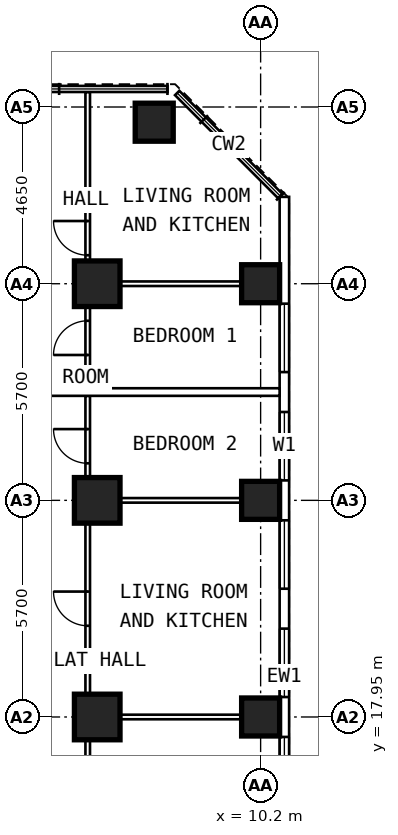
"""IFC4 building model, lengths in metres.
Left out: names, types, materials, properties, quantities, classifications, styles, units other than length and angle.
Written with IfcOpenShell. Run it as: python <this file> out.ifc"""

import sys

from ifc_helpers import new_model, si_unit, direction, frame, frame_2d, origin, origin_2d, place, context, subcontext, project, spatial, rectangle, extrude, element, fill, save


model = new_model("IFC4")
c1 = context("Model", 3, precision=1e-05, world=origin(), true_north=direction((0.0, 1.0)))
c2 = subcontext(c1, "Body", "Model", "MODEL_VIEW")
j1 = project(units=[si_unit("LENGTHUNIT", "METRE"), si_unit("PLANEANGLEUNIT", "RADIAN")], contexts=[c1])
p1 = place(None, origin())
s1 = spatial("IfcSite", under=j1, at=p1, CompositionType="ELEMENT")
p2 = place(p1, origin())
s2 = spatial("IfcBuilding", under=s1, at=p2, CompositionType="ELEMENT")
p3 = place(p2, frame((0.0, 0.0, 71.8)))
s3 = spatial("IfcBuildingStorey", under=s2, at=p3, CompositionType="ELEMENT", Elevation=71.8)
for number, where, z_axis, x_axis in (
    (1, (10.2, 17.95, 0.0), (0.0, 0.0, 1.0), (0.0, 1.0, 0.0)),
    (2, (10.2, 23.65, 0.0), (0.0, 0.0, 1.0), (0.0, 1.0, 0.0)),
    (3, (10.2, 29.35, 0.0), (0.0, 0.0, 1.0), (0.0, 1.0, 0.0)),
    (4, (7.4, 33.6, 0.0), (0.0, 0.0, 1.0), (0.0, 1.0, 0.0)),
):
    element("IfcColumn", number, at=place(p3, frame(where, z_axis=z_axis, x_axis=x_axis)), inside=s3, PredefinedType="COLUMN", context=c2, shape_type="SweptSolid", body=[
        extrude(rectangle(XDim=1.0, YDim=1.0, at=origin_2d()), origin(), (0.0, 0.0, 1.0), 3.6),
    ])
for number, where, z_axis, x_axis in (
    (5, (5.9, 17.95, 0.0), (0.0, 0.0, 1.0), (0.0, 1.0, 0.0)),
    (6, (5.9, 23.65, 0.0), (0.0, 0.0, 1.0), (0.0, 1.0, 0.0)),
    (7, (5.9, 29.35, 0.0), (0.0, 0.0, 1.0), (0.0, 1.0, 0.0)),
):
    element("IfcColumn", number, at=place(p3, frame(where, z_axis=z_axis, x_axis=x_axis)), inside=s3, PredefinedType="COLUMN", context=c2, shape_type="SweptSolid", body=[
        extrude(rectangle(XDim=1.2, YDim=1.2, at=origin_2d()), origin(), (0.0, 0.0, 1.0), 3.6),
    ])
p4 = place(p3, frame((10.825, 6.394, 0.0), z_axis=(0.0, 0.0, 1.0), x_axis=(0.0, 1.0, 0.0)))
e8 = element("IfcWall", 8, at=p4, inside=s3, PredefinedType="SOLIDWALL", context=c2, shape_type="SweptSolid", body=[
    extrude(rectangle(XDim=25.241, YDim=0.25, at=frame_2d((12.621, 0.0))), origin(), (0.0, 0.0, 1.0), 3.35),
])
p5 = place(p4, frame((0.681, 0.0, 0.8)))
e9 = element("IfcOpeningElement", 9, at=p5, cuts=e8, PredefinedType="OPENING", context=c2, shape_type="SweptSolid", body=[
    extrude(rectangle(XDim=1.8, YDim=1.8, at=frame_2d((0.9, 0.9))), frame((0.0, 0.137, 0.0), z_axis=(0.0, -1.0, 0.0), x_axis=(1.0, 0.0, 0.0)), (0.0, 0.0, 1.0), 0.274),
])
p6 = place(p4, frame((3.531, 0.0, 0.8)))
e10 = element("IfcOpeningElement", 10, at=p6, cuts=e8, PredefinedType="OPENING", context=c2, shape_type="SweptSolid", body=[
    extrude(rectangle(XDim=1.8, YDim=1.8, at=frame_2d((0.9, 0.9))), frame((0.0, 0.137, 0.0), z_axis=(0.0, -1.0, 0.0), x_axis=(1.0, 0.0, 0.0)), (0.0, 0.0, 1.0), 0.274),
])
p7 = place(p4, frame((6.381, 0.0, 0.8)))
e11 = element("IfcOpeningElement", 11, at=p7, cuts=e8, PredefinedType="OPENING", context=c2, shape_type="SweptSolid", body=[
    extrude(rectangle(XDim=1.8, YDim=1.8, at=frame_2d((0.9, 0.9))), frame((0.0, 0.137, 0.0), z_axis=(0.0, -1.0, 0.0), x_axis=(1.0, 0.0, 0.0)), (0.0, 0.0, 1.0), 0.274),
])
p8 = place(p4, frame((9.231, 0.0, 0.8)))
e12 = element("IfcOpeningElement", 12, at=p8, cuts=e8, PredefinedType="OPENING", context=c2, shape_type="SweptSolid", body=[
    extrude(rectangle(XDim=1.8, YDim=1.8, at=frame_2d((0.9, 0.9))), frame((0.0, 0.137, 0.0), z_axis=(0.0, -1.0, 0.0), x_axis=(1.0, 0.0, 0.0)), (0.0, 0.0, 1.0), 0.274),
])
p9 = place(p4, frame((12.081, 0.0, 0.8)))
e13 = element("IfcOpeningElement", 13, at=p9, cuts=e8, PredefinedType="OPENING", context=c2, shape_type="SweptSolid", body=[
    extrude(rectangle(XDim=1.8, YDim=1.8, at=frame_2d((0.9, 0.9))), frame((0.0, 0.137, 0.0), z_axis=(0.0, -1.0, 0.0), x_axis=(1.0, 0.0, 0.0)), (0.0, 0.0, 1.0), 0.274),
])
p10 = place(p4, frame((14.931, 0.0, 0.8)))
e14 = element("IfcOpeningElement", 14, at=p10, cuts=e8, PredefinedType="OPENING", context=c2, shape_type="SweptSolid", body=[
    extrude(rectangle(XDim=1.8, YDim=1.8, at=frame_2d((0.9, 0.9))), frame((0.0, 0.137, 0.0), z_axis=(0.0, -1.0, 0.0), x_axis=(1.0, 0.0, 0.0)), (0.0, 0.0, 1.0), 0.274),
])
p11 = place(p4, frame((17.781, 0.0, 0.8)))
e15 = element("IfcOpeningElement", 15, at=p11, cuts=e8, PredefinedType="OPENING", context=c2, shape_type="SweptSolid", body=[
    extrude(rectangle(XDim=1.8, YDim=1.8, at=frame_2d((0.9, 0.9))), frame((0.0, 0.137, 0.0), z_axis=(0.0, -1.0, 0.0), x_axis=(1.0, 0.0, 0.0)), (0.0, 0.0, 1.0), 0.274),
])
p12 = place(p4, frame((20.631, 0.0, 0.8)))
e16 = element("IfcOpeningElement", 16, at=p12, cuts=e8, PredefinedType="OPENING", context=c2, shape_type="SweptSolid", body=[
    extrude(rectangle(XDim=1.8, YDim=1.8, at=frame_2d((0.9, 0.9))), frame((0.0, 0.137, 0.0), z_axis=(0.0, -1.0, 0.0), x_axis=(1.0, 0.0, 0.0)), (0.0, 0.0, 1.0), 0.274),
])
p13 = place(p3, frame((5.65, 9.6, 0.0), z_axis=(0.0, 0.0, 1.0), x_axis=(0.0, 1.0, 0.0)))
e17 = element("IfcWall", 17, at=p13, inside=s3, PredefinedType="PARTITIONING", context=c2, shape_type="SweptSolid", body=[
    extrude(rectangle(XDim=16.8, YDim=0.12, at=frame_2d((8.4, 0.0))), origin(), (0.0, 0.0, 1.0), 3.35),
])
p14 = place(p13, frame((1.0, 0.0, 0.0)))
e18 = element("IfcOpeningElement", 18, at=p14, cuts=e17, PredefinedType="OPENING", context=c2, shape_type="SweptSolid", body=[
    extrude(rectangle(XDim=0.9, YDim=2.1, at=frame_2d((0.45, 1.05))), frame((0.0, 0.072, 0.0), z_axis=(0.0, -1.0, 0.0), x_axis=(1.0, 0.0, 0.0)), (0.0, 0.0, 1.0), 0.144),
])
p15 = place(p13, frame((5.05, 0.0, 0.0)))
e19 = element("IfcOpeningElement", 19, at=p15, cuts=e17, PredefinedType="OPENING", context=c2, shape_type="SweptSolid", body=[
    extrude(rectangle(XDim=0.9, YDim=2.1, at=frame_2d((0.45, 1.05))), frame((0.0, 0.072, 0.0), z_axis=(0.0, -1.0, 0.0), x_axis=(1.0, 0.0, 0.0)), (0.0, 0.0, 1.0), 0.144),
])
p16 = place(p13, frame((10.75, 0.0, 0.0)))
e20 = element("IfcOpeningElement", 20, at=p16, cuts=e17, PredefinedType="OPENING", context=c2, shape_type="SweptSolid", body=[
    extrude(rectangle(XDim=0.9, YDim=2.1, at=frame_2d((0.45, 1.05))), frame((0.0, 0.072, 0.0), z_axis=(0.0, -1.0, 0.0), x_axis=(1.0, 0.0, 0.0)), (0.0, 0.0, 1.0), 0.144),
])
p17 = place(p13, frame((15.025, 0.0, 0.0)))
e21 = element("IfcOpeningElement", 21, at=p17, cuts=e17, PredefinedType="OPENING", context=c2, shape_type="SweptSolid", body=[
    extrude(rectangle(XDim=0.9, YDim=2.1, at=frame_2d((0.45, 1.05))), frame((0.0, 0.072, 0.0), z_axis=(0.0, -1.0, 0.0), x_axis=(1.0, 0.0, 0.0)), (0.0, 0.0, 1.0), 0.144),
])
for number, where, z_axis, x_axis in (
    (22, (5.71, 17.95, 0.0), (0.0, 0.0, 1.0), (1.0, 0.0, 0.0)),
    (23, (5.71, 23.65, 0.0), (0.0, 0.0, 1.0), (1.0, 0.0, 0.0)),
):
    element("IfcWall", number, at=place(p3, frame(where, z_axis=z_axis, x_axis=x_axis)), inside=s3, PredefinedType="PARTITIONING", context=c2, shape_type="SweptSolid", body=[
        extrude(rectangle(XDim=4.99, YDim=0.12, at=frame_2d((2.495, 0.0))), origin(), (0.0, 0.0, 1.0), 2.45),
    ])
p18 = place(p3, frame((5.65, 26.6, 0.0), z_axis=(0.0, 0.0, 1.0), x_axis=(0.0, 1.0, 0.0)))
e24 = element("IfcWall", 24, at=p18, inside=s3, PredefinedType="PARTITIONING", context=c2, shape_type="SweptSolid", body=[
    extrude(rectangle(XDim=7.795, YDim=0.12, at=frame_2d((3.897, 0.0))), origin(), (0.0, 0.0, 1.0), 3.35),
])
p19 = place(p18, frame((0.875, 0.0, 0.0)))
e25 = element("IfcOpeningElement", 25, at=p19, cuts=e24, PredefinedType="OPENING", context=c2, shape_type="SweptSolid", body=[
    extrude(rectangle(XDim=0.9, YDim=2.1, at=frame_2d((0.45, 1.05))), frame((0.0, 0.072, 0.0), z_axis=(0.0, -1.0, 0.0), x_axis=(1.0, 0.0, 0.0)), (0.0, 0.0, 1.0), 0.144),
])
p20 = place(p18, frame((3.5, 0.0, 0.0)))
e26 = element("IfcOpeningElement", 26, at=p20, cuts=e24, PredefinedType="OPENING", context=c2, shape_type="SweptSolid", body=[
    extrude(rectangle(XDim=0.9, YDim=2.1, at=frame_2d((0.45, 1.05))), frame((0.0, 0.072, 0.0), z_axis=(0.0, -1.0, 0.0), x_axis=(1.0, 0.0, 0.0)), (0.0, 0.0, 1.0), 0.144),
])
p21 = place(p3, frame((5.71, 29.35, 0.0), z_axis=(0.0, 0.0, 1.0), x_axis=(1.0, 0.0, 0.0)))
e27 = element("IfcWall", 27, at=p21, inside=s3, PredefinedType="PARTITIONING", context=c2, shape_type="SweptSolid", body=[
    extrude(rectangle(XDim=4.99, YDim=0.12, at=frame_2d((2.495, 0.0))), origin(), (0.0, 0.0, 1.0), 2.45),
])
p22 = place(p3, frame((2.1, 26.5, 0.0), z_axis=(0.0, 0.0, 1.0), x_axis=(1.0, 0.0, 0.0)))
e28 = element("IfcWall", 28, at=p22, inside=s3, PredefinedType="PARTITIONING", context=c2, shape_type="SweptSolid", body=[
    extrude(rectangle(XDim=8.6, YDim=0.2, at=frame_2d((4.3, 0.0))), origin(), (0.0, 0.0, 1.0), 3.35),
])
p23 = place(p8, origin())
e29 = element("IfcWindow", 29, at=p23, inside=s3, PartitioningType="SINGLE_PANEL", PredefinedType="WINDOW", context=c2, shape_type="SweptSolid", body=[
    extrude(rectangle(XDim=1.8, YDim=1.8, at=frame_2d((0.9, 0.9))), frame((0.0, 0.03, 0.0), z_axis=(0.0, -1.0, 0.0), x_axis=(1.0, 0.0, 0.0)), (0.0, 0.0, 1.0), 0.06),
])
fill(e12, e29)
p24 = place(p9, origin())
e30 = element("IfcWindow", 30, at=p24, inside=s3, PartitioningType="SINGLE_PANEL", PredefinedType="WINDOW", context=c2, shape_type="SweptSolid", body=[
    extrude(rectangle(XDim=1.8, YDim=1.8, at=frame_2d((0.9, 0.9))), frame((0.0, 0.03, 0.0), z_axis=(0.0, -1.0, 0.0), x_axis=(1.0, 0.0, 0.0)), (0.0, 0.0, 1.0), 0.06),
])
fill(e13, e30)
p25 = place(p10, origin())
e31 = element("IfcWindow", 31, at=p25, inside=s3, PartitioningType="SINGLE_PANEL", PredefinedType="WINDOW", context=c2, shape_type="SweptSolid", body=[
    extrude(rectangle(XDim=1.8, YDim=1.8, at=frame_2d((0.9, 0.9))), frame((0.0, 0.03, 0.0), z_axis=(0.0, -1.0, 0.0), x_axis=(1.0, 0.0, 0.0)), (0.0, 0.0, 1.0), 0.06),
])
fill(e14, e31)
p26 = place(p11, origin())
e32 = element("IfcWindow", 32, at=p26, inside=s3, PartitioningType="SINGLE_PANEL", PredefinedType="WINDOW", context=c2, shape_type="SweptSolid", body=[
    extrude(rectangle(XDim=1.8, YDim=1.8, at=frame_2d((0.9, 0.9))), frame((0.0, 0.03, 0.0), z_axis=(0.0, -1.0, 0.0), x_axis=(1.0, 0.0, 0.0)), (0.0, 0.0, 1.0), 0.06),
])
fill(e15, e32)
p27 = place(p12, origin())
e33 = element("IfcWindow", 33, at=p27, inside=s3, PartitioningType="SINGLE_PANEL", PredefinedType="WINDOW", context=c2, shape_type="SweptSolid", body=[
    extrude(rectangle(XDim=1.8, YDim=1.8, at=frame_2d((0.9, 0.9))), frame((0.0, 0.03, 0.0), z_axis=(0.0, -1.0, 0.0), x_axis=(1.0, 0.0, 0.0)), (0.0, 0.0, 1.0), 0.06),
])
fill(e16, e33)
p28 = place(p16, origin())
e34 = element("IfcDoor", 34, at=p28, inside=s3, OperationType="SINGLE_SWING_RIGHT", PredefinedType="DOOR", context=c2, shape_type="SweptSolid", body=[
    extrude(rectangle(XDim=0.9, YDim=2.1, at=frame_2d((0.45, 1.05))), frame((0.0, 0.025, 0.0), z_axis=(0.0, -1.0, 0.0), x_axis=(1.0, 0.0, 0.0)), (0.0, 0.0, 1.0), 0.05),
])
fill(e20, e34)
p29 = place(p17, origin())
e35 = element("IfcDoor", 35, at=p29, inside=s3, OperationType="SINGLE_SWING_RIGHT", PredefinedType="DOOR", context=c2, shape_type="SweptSolid", body=[
    extrude(rectangle(XDim=0.9, YDim=2.1, at=frame_2d((0.45, 1.05))), frame((0.0, 0.025, 0.0), z_axis=(0.0, -1.0, 0.0), x_axis=(1.0, 0.0, 0.0)), (0.0, 0.0, 1.0), 0.05),
])
fill(e21, e35)
p30 = place(p19, origin())
e36 = element("IfcDoor", 36, at=p30, inside=s3, OperationType="SINGLE_SWING_LEFT", PredefinedType="DOOR", context=c2, shape_type="SweptSolid", body=[
    extrude(rectangle(XDim=0.9, YDim=2.1, at=frame_2d((0.45, 1.05))), frame((0.0, 0.025, 0.0), z_axis=(0.0, -1.0, 0.0), x_axis=(1.0, 0.0, 0.0)), (0.0, 0.0, 1.0), 0.05),
])
fill(e25, e36)
p31 = place(p20, origin())
e37 = element("IfcDoor", 37, at=p31, inside=s3, OperationType="SINGLE_SWING_RIGHT", PredefinedType="DOOR", context=c2, shape_type="SweptSolid", body=[
    extrude(rectangle(XDim=0.9, YDim=2.1, at=frame_2d((0.45, 1.05))), frame((0.0, 0.025, 0.0), z_axis=(0.0, -1.0, 0.0), x_axis=(1.0, 0.0, 0.0)), (0.0, 0.0, 1.0), 0.05),
])
fill(e26, e37)
save(model, sys.argv[1])
